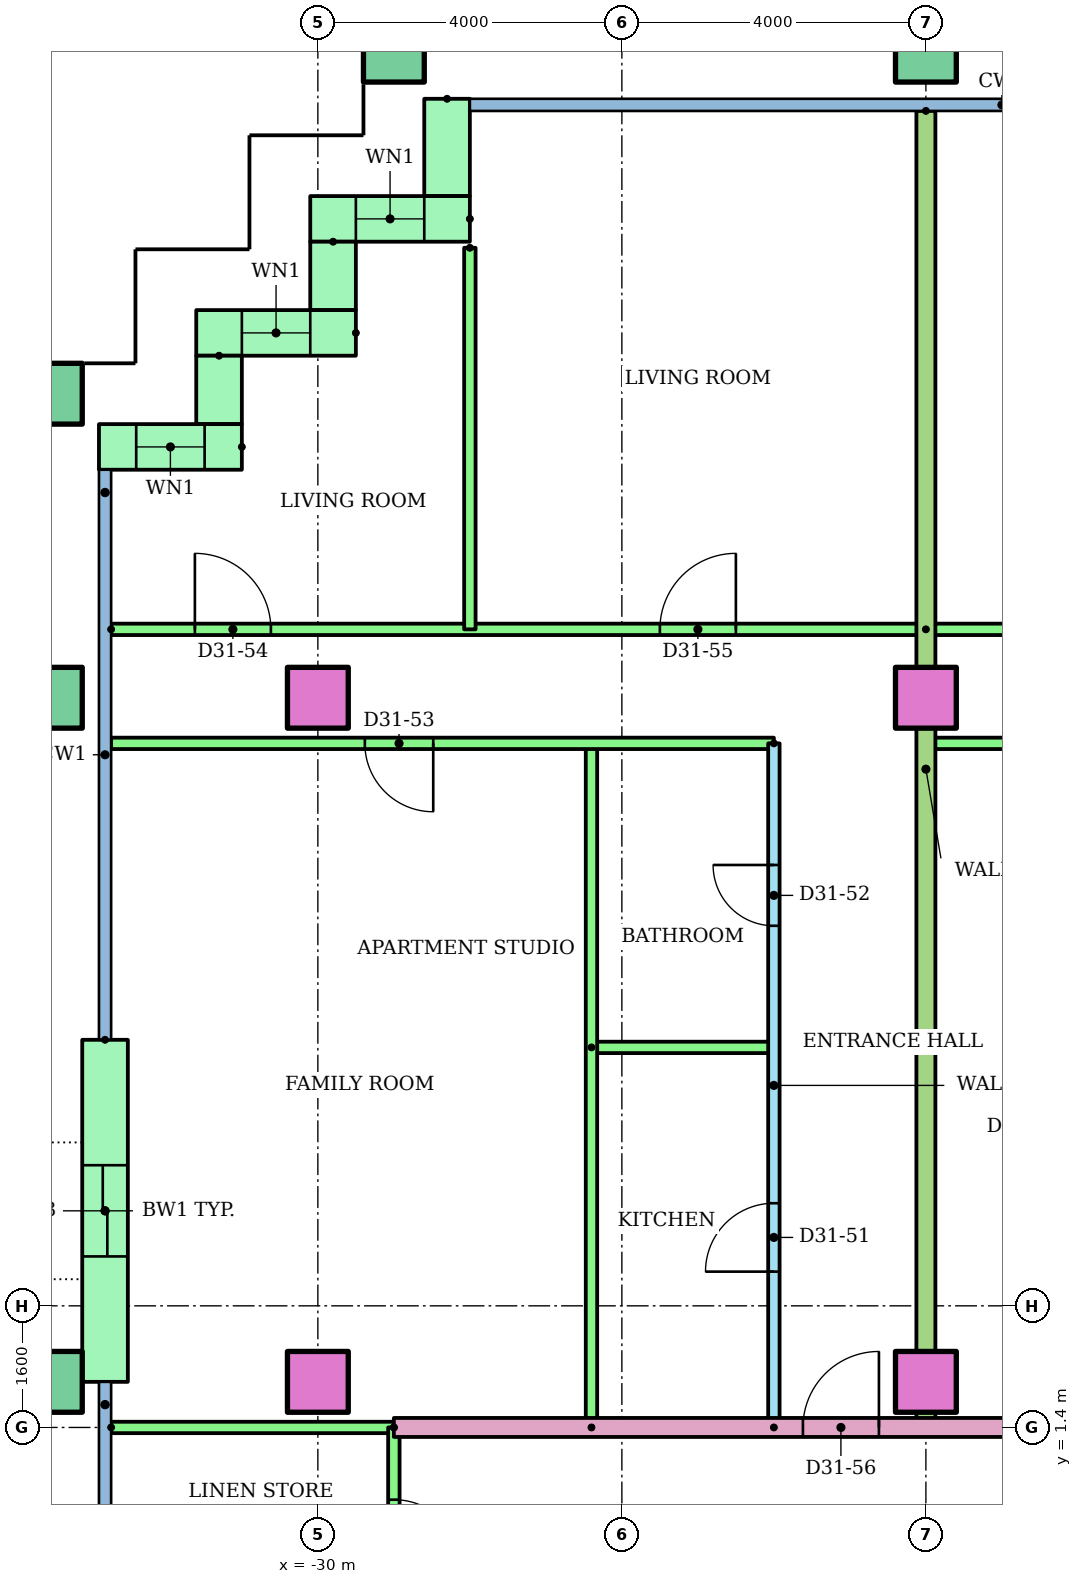
"""IFC4 building model, lengths in metres.
Left out: names, types, materials, properties, quantities, classifications, styles, units other than length and angle.
Written with IfcOpenShell. Run it as: python <this file> out.ifc"""

import sys

from ifc_helpers import new_model, si_unit, direction, frame, frame_2d, origin, origin_2d, place, context, subcontext, project, spatial, rectangle, hollow_rectangle, extrude, element, fill, save


model = new_model("IFC4")
c1 = context("Model", 3, precision=1e-05, world=origin(), true_north=direction((0.0, 1.0)))
c2 = subcontext(c1, "Body", "Model", "MODEL_VIEW")
j1 = project(units=[si_unit("LENGTHUNIT", "METRE"), si_unit("PLANEANGLEUNIT", "RADIAN")], contexts=[c1])
p1 = place(None, origin())
s1 = spatial("IfcSite", under=j1, at=p1, CompositionType="ELEMENT")
p2 = place(p1, origin())
s2 = spatial("IfcBuilding", under=s1, at=p2, CompositionType="ELEMENT")
p3 = place(p2, frame((0.0, 0.0, 123.0)))
s3 = spatial("IfcBuildingStorey", under=s2, at=p3, CompositionType="ELEMENT", Elevation=123.0)
p4 = place(p3, frame((-33.5, 2.0, 0.0)))
e1 = element("IfcColumn", 1, at=p4, inside=s3, PredefinedType="COLUMN", context=c2, shape_type="SweptSolid", body=[
    extrude(hollow_rectangle(XDim=0.8, YDim=0.8, WallThickness=0.04, at=origin_2d()), origin(), (0.0, 0.0, 1.0), 3.2),
])
for number, where in (
    (2, (-30.0, 2.0, 0.0)),
    (3, (-22.0, 2.0, 0.0)),
):
    element("IfcColumn", number, at=place(p3, frame(where)), inside=s3, PredefinedType="COLUMN", context=c2, shape_type="SweptSolid", body=[
        extrude(rectangle(XDim=0.8, YDim=0.8, at=origin_2d()), origin(), (0.0, 0.0, 1.0), 3.2),
    ])
p5 = place(p3, frame((-33.5, 11.0, 0.0)))
e4 = element("IfcColumn", 4, at=p5, inside=s3, PredefinedType="COLUMN", context=c2, shape_type="SweptSolid", body=[
    extrude(hollow_rectangle(XDim=0.8, YDim=0.8, WallThickness=0.04, at=origin_2d()), origin(), (0.0, 0.0, 1.0), 3.2),
])
for number, where in (
    (5, (-30.0, 11.0, 0.0)),
    (6, (-22.0, 11.0, 0.0)),
):
    element("IfcColumn", number, at=place(p3, frame(where)), inside=s3, PredefinedType="COLUMN", context=c2, shape_type="SweptSolid", body=[
        extrude(rectangle(XDim=0.8, YDim=0.8, at=origin_2d()), origin(), (0.0, 0.0, 1.0), 3.2),
    ])
for number, where in (
    (7, (-33.5, 15.0, 0.0)),
    (8, (-29.0, 19.5, 0.0)),
    (9, (-22.0, 19.5, 0.0)),
):
    element("IfcColumn", number, at=place(p3, frame(where)), inside=s3, PredefinedType="COLUMN", context=c2, shape_type="SweptSolid", body=[
        extrude(hollow_rectangle(XDim=0.8, YDim=0.8, WallThickness=0.04, at=origin_2d()), origin(), (0.0, 0.0, 1.0), 3.2),
    ])
p6 = place(p3, frame((-28.3, 18.88, 0.0), z_axis=(0.0, 0.0, 1.0), x_axis=(0.0, -1.0, 0.0)))
e10 = element("IfcWall", 10, at=p6, inside=s3, PredefinedType="STANDARD", context=c2, shape_type="SweptSolid", body=[
    extrude(rectangle(XDim=1.28, YDim=0.6, at=frame_2d((0.64, 0.0))), origin(), (0.0, 0.0, 1.0), 2.92),
])
p7 = place(p3, frame((-28.0, 17.3, 0.0), z_axis=(0.0, 0.0, 1.0), x_axis=(-1.0, 0.0, 0.0)))
e11 = element("IfcWall", 11, at=p7, inside=s3, PredefinedType="STANDARD", context=c2, shape_type="SweptSolid", body=[
    extrude(rectangle(XDim=2.1, YDim=0.6, at=frame_2d((1.05, 0.0))), origin(), (0.0, 0.0, 1.0), 2.92),
])
p8 = place(p7, frame((0.6, 0.0, 0.9)))
e12 = element("IfcOpeningElement", 12, at=p8, cuts=e11, PredefinedType="OPENING", context=c2, shape_type="SweptSolid", body=[
    extrude(rectangle(XDim=0.9, YDim=1.5, at=frame_2d((0.45, 0.75))), frame((0.0, 0.31, 0.0), z_axis=(0.0, -1.0, 0.0), x_axis=(1.0, 0.0, 0.0)), (0.0, 0.0, 1.0), 0.62),
])
p9 = place(p3, frame((-29.8, 17.0, 0.0), z_axis=(0.0, 0.0, 1.0), x_axis=(0.0, -1.0, 0.0)))
e13 = element("IfcWall", 13, at=p9, inside=s3, PredefinedType="STANDARD", context=c2, shape_type="SweptSolid", body=[
    extrude(rectangle(XDim=0.9, YDim=0.6, at=frame_2d((0.45, 0.0))), origin(), (0.0, 0.0, 1.0), 2.92),
])
p10 = place(p3, frame((-29.5, 15.8, 0.0), z_axis=(0.0, 0.0, 1.0), x_axis=(-1.0, 0.0, 0.0)))
e14 = element("IfcWall", 14, at=p10, inside=s3, PredefinedType="STANDARD", context=c2, shape_type="SweptSolid", body=[
    extrude(rectangle(XDim=2.1, YDim=0.6, at=frame_2d((1.05, 0.0))), origin(), (0.0, 0.0, 1.0), 2.92),
])
p11 = place(p10, frame((0.6, 0.0, 0.9)))
e15 = element("IfcOpeningElement", 15, at=p11, cuts=e14, PredefinedType="OPENING", context=c2, shape_type="SweptSolid", body=[
    extrude(rectangle(XDim=0.9, YDim=1.5, at=frame_2d((0.45, 0.75))), frame((0.0, 0.31, 0.0), z_axis=(0.0, -1.0, 0.0), x_axis=(1.0, 0.0, 0.0)), (0.0, 0.0, 1.0), 0.62),
])
p12 = place(p3, frame((-31.3, 15.5, 0.0), z_axis=(0.0, 0.0, 1.0), x_axis=(0.0, -1.0, 0.0)))
e16 = element("IfcWall", 16, at=p12, inside=s3, PredefinedType="STANDARD", context=c2, shape_type="SweptSolid", body=[
    extrude(rectangle(XDim=0.9, YDim=0.6, at=frame_2d((0.45, 0.0))), origin(), (0.0, 0.0, 1.0), 2.92),
])
p13 = place(p3, frame((-31.0, 14.3, 0.0), z_axis=(0.0, 0.0, 1.0), x_axis=(-1.0, 0.0, 0.0)))
e17 = element("IfcWall", 17, at=p13, inside=s3, PredefinedType="STANDARD", context=c2, shape_type="SweptSolid", body=[
    extrude(rectangle(XDim=1.88, YDim=0.6, at=frame_2d((0.94, 0.0))), origin(), (0.0, 0.0, 1.0), 2.92),
])
p14 = place(p13, frame((0.49, 0.0, 0.9)))
e18 = element("IfcOpeningElement", 18, at=p14, cuts=e17, PredefinedType="OPENING", context=c2, shape_type="SweptSolid", body=[
    extrude(rectangle(XDim=0.9, YDim=1.5, at=frame_2d((0.45, 0.75))), frame((0.0, 0.31, 0.0), z_axis=(0.0, -1.0, 0.0), x_axis=(1.0, 0.0, 0.0)), (0.0, 0.0, 1.0), 0.62),
])
p15 = place(p3, frame((-32.8, 6.5, 0.0), z_axis=(0.0, 0.0, 1.0), x_axis=(0.0, -1.0, 0.0)))
e19 = element("IfcWall", 19, at=p15, inside=s3, PredefinedType="STANDARD", context=c2, shape_type="SweptSolid", body=[
    extrude(rectangle(XDim=4.5, YDim=0.6, at=frame_2d((2.25, 0.0))), origin(), (0.0, 0.0, 1.0), 2.92),
])
p16 = place(p15, frame((1.65, 0.0, 0.0)))
e20 = element("IfcOpeningElement", 20, at=p16, cuts=e19, PredefinedType="OPENING", context=c2, shape_type="SweptSolid", body=[
    extrude(rectangle(XDim=1.2, YDim=2.1, at=frame_2d((0.6, 1.05))), frame((0.0, 0.31, 0.0), z_axis=(0.0, -1.0, 0.0), x_axis=(1.0, 0.0, 0.0)), (0.0, 0.0, 1.0), 0.62),
])
p17 = place(p3, frame((-24.0, 1.4, 0.0), z_axis=(0.0, 0.0, 1.0), x_axis=(0.0, 1.0, 0.0)))
e21 = element("IfcWall", 21, at=p17, inside=s3, PredefinedType="PARTITIONING", context=c2, shape_type="SweptSolid", body=[
    extrude(rectangle(XDim=9.0, YDim=0.15, at=frame_2d((4.5, 0.0))), origin(), (0.0, 0.0, 1.0), 2.4),
])
p18 = place(p17, frame((2.05, 0.0, 0.0)))
e22 = element("IfcOpeningElement", 22, at=p18, cuts=e21, PredefinedType="OPENING", context=c2, shape_type="SweptSolid", body=[
    extrude(rectangle(XDim=0.9, YDim=2.1, at=frame_2d((0.45, 1.05))), frame((0.0, 0.085, 0.0), z_axis=(0.0, -1.0, 0.0), x_axis=(1.0, 0.0, 0.0)), (0.0, 0.0, 1.0), 0.17),
])
p19 = place(p17, frame((6.6, 0.0, 0.0)))
e23 = element("IfcOpeningElement", 23, at=p19, cuts=e21, PredefinedType="OPENING", context=c2, shape_type="SweptSolid", body=[
    extrude(rectangle(XDim=0.8, YDim=2.1, at=frame_2d((0.4, 1.05))), frame((0.0, 0.085, 0.0), z_axis=(0.0, -1.0, 0.0), x_axis=(1.0, 0.0, 0.0)), (0.0, 0.0, 1.0), 0.17),
])
p20 = place(p3, frame((-26.4, 6.4, 0.0)))
e24 = element("IfcWall", 24, at=p20, inside=s3, PredefinedType="PARTITIONING", context=c2, shape_type="SweptSolid", body=[
    extrude(rectangle(XDim=2.4, YDim=0.15, at=frame_2d((1.2, 0.0))), origin(), (0.0, 0.0, 1.0), 2.4),
])
p21 = place(p3, frame((-26.4, 1.4, 0.0), z_axis=(0.0, 0.0, 1.0), x_axis=(0.0, 1.0, 0.0)))
e25 = element("IfcWall", 25, at=p21, inside=s3, PredefinedType="PARTITIONING", context=c2, shape_type="SweptSolid", body=[
    extrude(rectangle(XDim=9.0, YDim=0.15, at=frame_2d((4.5, 0.0))), origin(), (0.0, 0.0, 1.0), 2.4),
])
p22 = place(p3, frame((-24.0, 10.4, 0.0), z_axis=(0.0, 0.0, 1.0), x_axis=(-1.0, 0.0, 0.0)))
e26 = element("IfcWall", 26, at=p22, inside=s3, PredefinedType="PARTITIONING", context=c2, shape_type="SweptSolid", body=[
    extrude(rectangle(XDim=8.72, YDim=0.15, at=frame_2d((4.36, 0.0))), origin(), (0.0, 0.0, 1.0), 2.4),
])
p23 = place(p22, frame((4.482, 0.0, 0.0)))
e27 = element("IfcOpeningElement", 27, at=p23, cuts=e26, PredefinedType="OPENING", context=c2, shape_type="SweptSolid", body=[
    extrude(rectangle(XDim=0.9, YDim=2.1, at=frame_2d((0.45, 1.05))), frame((0.0, 0.085, 0.0), z_axis=(0.0, -1.0, 0.0), x_axis=(1.0, 0.0, 0.0)), (0.0, 0.0, 1.0), 0.17),
])
p24 = place(p3, frame((-32.72, 11.9, 0.0)))
e28 = element("IfcWall", 28, at=p24, inside=s3, PredefinedType="PARTITIONING", context=c2, shape_type="SweptSolid", body=[
    extrude(rectangle(XDim=10.72, YDim=0.15, at=frame_2d((5.36, 0.0))), origin(), (0.0, 0.0, 1.0), 2.4),
])
p25 = place(p24, frame((1.102, 0.0, 0.0)))
e29 = element("IfcOpeningElement", 29, at=p25, cuts=e28, PredefinedType="OPENING", context=c2, shape_type="SweptSolid", body=[
    extrude(rectangle(XDim=1.0, YDim=2.1, at=frame_2d((0.5, 1.05))), frame((0.0, 0.085, 0.0), z_axis=(0.0, -1.0, 0.0), x_axis=(1.0, 0.0, 0.0)), (0.0, 0.0, 1.0), 0.17),
])
p26 = place(p24, frame((7.22, 0.0, 0.0)))
e30 = element("IfcOpeningElement", 30, at=p26, cuts=e28, PredefinedType="OPENING", context=c2, shape_type="SweptSolid", body=[
    extrude(rectangle(XDim=1.0, YDim=2.1, at=frame_2d((0.5, 1.05))), frame((0.0, 0.085, 0.0), z_axis=(0.0, -1.0, 0.0), x_axis=(1.0, 0.0, 0.0)), (0.0, 0.0, 1.0), 0.17),
])
p27 = place(p3, frame((-28.0, 16.92, 0.0), z_axis=(0.0, 0.0, 1.0), x_axis=(0.0, -1.0, 0.0)))
e31 = element("IfcWall", 31, at=p27, inside=s3, PredefinedType="PARTITIONING", context=c2, shape_type="SweptSolid", body=[
    extrude(rectangle(XDim=5.02, YDim=0.15, at=frame_2d((2.51, 0.0))), origin(), (0.0, 0.0, 1.0), 2.4),
])
p28 = place(p3, frame((-16.0, 10.4, 0.0), z_axis=(0.0, 0.0, 1.0), x_axis=(-1.0, 0.0, 0.0)))
e32 = element("IfcWall", 32, at=p28, inside=s3, PredefinedType="PARTITIONING", context=c2, shape_type="SweptSolid", body=[
    extrude(rectangle(XDim=6.0, YDim=0.15, at=frame_2d((3.0, 0.0))), origin(), (0.0, 0.0, 1.0), 2.4),
])
p29 = place(p28, frame((3.75, 0.0, 0.0)))
e33 = element("IfcOpeningElement", 33, at=p29, cuts=e32, PredefinedType="OPENING", context=c2, shape_type="SweptSolid", body=[
    extrude(rectangle(XDim=0.9, YDim=2.1, at=frame_2d((0.45, 1.05))), frame((0.0, 0.085, 0.0), z_axis=(0.0, -1.0, 0.0), x_axis=(1.0, 0.0, 0.0)), (0.0, 0.0, 1.0), 0.17),
])
p30 = place(p3, frame((-22.0, 11.9, 0.0)))
e34 = element("IfcWall", 34, at=p30, inside=s3, PredefinedType="PARTITIONING", context=c2, shape_type="SweptSolid", body=[
    extrude(rectangle(XDim=8.0, YDim=0.15, at=frame_2d((4.0, 0.0))), origin(), (0.0, 0.0, 1.0), 2.4),
])
p31 = place(p30, frame((3.5, 0.0, 0.0)))
e35 = element("IfcOpeningElement", 35, at=p31, cuts=e34, PredefinedType="OPENING", context=c2, shape_type="SweptSolid", body=[
    extrude(rectangle(XDim=1.0, YDim=2.1, at=frame_2d((0.5, 1.05))), frame((0.0, 0.085, 0.0), z_axis=(0.0, -1.0, 0.0), x_axis=(1.0, 0.0, 0.0)), (0.0, 0.0, 1.0), 0.17),
])
p32 = place(p3, frame((-22.0, 18.721, 0.0), z_axis=(0.0, 0.0, 1.0), x_axis=(0.0, -1.0, 0.0)))
e36 = element("IfcWall", 36, at=p32, inside=s3, PredefinedType="PARTITIONING", context=c2, shape_type="SweptSolid", body=[
    extrude(rectangle(XDim=17.321, YDim=0.25, at=frame_2d((8.661, 0.0))), origin(), (0.0, 0.0, 1.0), 2.4),
])
p33 = place(p3, frame((-29.0, 1.4, 0.0)))
e37 = element("IfcWall", 37, at=p33, inside=s3, PredefinedType="PARTITIONING", context=c2, shape_type="SweptSolid", body=[
    extrude(rectangle(XDim=15.0, YDim=0.25, at=frame_2d((7.5, 0.0))), origin(), (0.0, 0.0, 1.0), 2.4),
])
p34 = place(p33, frame((5.382, 0.0, 0.0)))
e38 = element("IfcOpeningElement", 38, at=p34, cuts=e37, PredefinedType="OPENING", context=c2, shape_type="SweptSolid", body=[
    extrude(rectangle(XDim=1.0, YDim=2.1, at=frame_2d((0.5, 1.05))), frame((0.0, 0.135, 0.0), z_axis=(0.0, -1.0, 0.0), x_axis=(1.0, 0.0, 0.0)), (0.0, 0.0, 1.0), 0.27),
])
p35 = place(p33, frame((13.5, 0.0, 0.0)))
e39 = element("IfcOpeningElement", 39, at=p35, cuts=e37, PredefinedType="OPENING", context=c2, shape_type="SweptSolid", body=[
    extrude(rectangle(XDim=1.0, YDim=2.1, at=frame_2d((0.5, 1.05))), frame((0.0, 0.135, 0.0), z_axis=(0.0, -1.0, 0.0), x_axis=(1.0, 0.0, 0.0)), (0.0, 0.0, 1.0), 0.27),
])
p36 = place(p3, frame((-32.72, 1.4, 0.0)))
e40 = element("IfcWall", 40, at=p36, inside=s3, PredefinedType="PARTITIONING", context=c2, shape_type="SweptSolid", body=[
    extrude(rectangle(XDim=3.72, YDim=0.15, at=frame_2d((1.86, 0.0))), origin(), (0.0, 0.0, 1.0), 2.4),
])
p37 = place(p3, frame((-29.0, 1.4, 0.0), z_axis=(0.0, 0.0, 1.0), x_axis=(0.0, -1.0, 0.0)))
e41 = element("IfcWall", 41, at=p37, inside=s3, PredefinedType="PARTITIONING", context=c2, shape_type="SweptSolid", body=[
    extrude(rectangle(XDim=2.8, YDim=0.15, at=frame_2d((1.4, 0.0))), origin(), (0.0, 0.0, 1.0), 2.4),
])
p38 = place(p37, frame((0.95, 0.0, 0.0)))
e42 = element("IfcOpeningElement", 42, at=p38, cuts=e41, PredefinedType="OPENING", context=c2, shape_type="SweptSolid", body=[
    extrude(rectangle(XDim=0.9, YDim=2.1, at=frame_2d((0.45, 1.05))), frame((0.0, 0.085, 0.0), z_axis=(0.0, -1.0, 0.0), x_axis=(1.0, 0.0, 0.0)), (0.0, 0.0, 1.0), 0.17),
])
p39 = place(p8, origin())
e43 = element("IfcWindow", 43, at=p39, inside=s3, PartitioningType="SINGLE_PANEL", PredefinedType="WINDOW", context=c2, shape_type="SweptSolid", body=[
    extrude(rectangle(XDim=0.9, YDim=1.5, at=frame_2d((0.45, 0.75))), frame((0.0, 0.03, 0.0), z_axis=(0.0, -1.0, 0.0), x_axis=(1.0, 0.0, 0.0)), (0.0, 0.0, 1.0), 0.06),
])
fill(e12, e43)
p40 = place(p11, origin())
e44 = element("IfcWindow", 44, at=p40, inside=s3, PartitioningType="SINGLE_PANEL", PredefinedType="WINDOW", context=c2, shape_type="SweptSolid", body=[
    extrude(rectangle(XDim=0.9, YDim=1.5, at=frame_2d((0.45, 0.75))), frame((0.0, 0.03, 0.0), z_axis=(0.0, -1.0, 0.0), x_axis=(1.0, 0.0, 0.0)), (0.0, 0.0, 1.0), 0.06),
])
fill(e15, e44)
p41 = place(p14, origin())
e45 = element("IfcWindow", 45, at=p41, inside=s3, PartitioningType="SINGLE_PANEL", PredefinedType="WINDOW", context=c2, shape_type="SweptSolid", body=[
    extrude(rectangle(XDim=0.9, YDim=1.5, at=frame_2d((0.45, 0.75))), frame((0.0, 0.03, 0.0), z_axis=(0.0, -1.0, 0.0), x_axis=(1.0, 0.0, 0.0)), (0.0, 0.0, 1.0), 0.06),
])
fill(e18, e45)
p42 = place(p18, origin())
e46 = element("IfcDoor", 46, at=p42, inside=s3, OperationType="SINGLE_SWING_LEFT", PredefinedType="DOOR", context=c2, shape_type="SweptSolid", body=[
    extrude(rectangle(XDim=0.9, YDim=2.1, at=frame_2d((0.45, 1.05))), frame((0.0, 0.025, 0.0), z_axis=(0.0, -1.0, 0.0), x_axis=(1.0, 0.0, 0.0)), (0.0, 0.0, 1.0), 0.05),
])
fill(e22, e46)
p43 = place(p19, origin())
e47 = element("IfcDoor", 47, at=p43, inside=s3, OperationType="SINGLE_SWING_RIGHT", PredefinedType="DOOR", context=c2, shape_type="SweptSolid", body=[
    extrude(rectangle(XDim=0.8, YDim=2.1, at=frame_2d((0.4, 1.05))), frame((0.0, 0.025, 0.0), z_axis=(0.0, -1.0, 0.0), x_axis=(1.0, 0.0, 0.0)), (0.0, 0.0, 1.0), 0.05),
])
fill(e23, e47)
p44 = place(p23, origin())
e48 = element("IfcDoor", 48, at=p44, inside=s3, OperationType="SINGLE_SWING_LEFT", PredefinedType="DOOR", context=c2, shape_type="SweptSolid", body=[
    extrude(rectangle(XDim=0.9, YDim=2.1, at=frame_2d((0.45, 1.05))), frame((0.0, 0.025, 0.0), z_axis=(0.0, -1.0, 0.0), x_axis=(1.0, 0.0, 0.0)), (0.0, 0.0, 1.0), 0.05),
])
fill(e27, e48)
p45 = place(p25, origin())
e49 = element("IfcDoor", 49, at=p45, inside=s3, OperationType="SINGLE_SWING_LEFT", PredefinedType="DOOR", context=c2, shape_type="SweptSolid", body=[
    extrude(rectangle(XDim=1.0, YDim=2.1, at=frame_2d((0.5, 1.05))), frame((0.0, 0.025, 0.0), z_axis=(0.0, -1.0, 0.0), x_axis=(1.0, 0.0, 0.0)), (0.0, 0.0, 1.0), 0.05),
])
fill(e29, e49)
p46 = place(p26, origin())
e50 = element("IfcDoor", 50, at=p46, inside=s3, OperationType="SINGLE_SWING_RIGHT", PredefinedType="DOOR", context=c2, shape_type="SweptSolid", body=[
    extrude(rectangle(XDim=1.0, YDim=2.1, at=frame_2d((0.5, 1.05))), frame((0.0, 0.025, 0.0), z_axis=(0.0, -1.0, 0.0), x_axis=(1.0, 0.0, 0.0)), (0.0, 0.0, 1.0), 0.05),
])
fill(e30, e50)
p47 = place(p34, origin())
e51 = element("IfcDoor", 51, at=p47, inside=s3, OperationType="SINGLE_SWING_RIGHT", PredefinedType="DOOR", context=c2, shape_type="SweptSolid", body=[
    extrude(rectangle(XDim=1.0, YDim=2.1, at=frame_2d((0.5, 1.05))), frame((0.0, 0.025, 0.0), z_axis=(0.0, -1.0, 0.0), x_axis=(1.0, 0.0, 0.0)), (0.0, 0.0, 1.0), 0.05),
])
fill(e38, e51)
p48 = place(p38, origin())
e52 = element("IfcDoor", 52, at=p48, inside=s3, OperationType="SINGLE_SWING_RIGHT", PredefinedType="DOOR", context=c2, shape_type="SweptSolid", body=[
    extrude(rectangle(XDim=0.9, YDim=2.1, at=frame_2d((0.45, 1.05))), frame((0.0, 0.025, 0.0), z_axis=(0.0, -1.0, 0.0), x_axis=(1.0, 0.0, 0.0)), (0.0, 0.0, 1.0), 0.05),
])
fill(e42, e52)
p49 = place(p16, origin())
e53 = element("IfcDoor", 53, at=p49, inside=s3, OperationType="SLIDING_TO_LEFT", PredefinedType="DOOR", context=c2, shape_type="SweptSolid", body=[
    extrude(rectangle(XDim=1.2, YDim=2.1, at=frame_2d((0.6, 1.05))), frame((0.0, 0.025, 0.0), z_axis=(0.0, -1.0, 0.0), x_axis=(1.0, 0.0, 0.0)), (0.0, 0.0, 1.0), 0.05),
])
fill(e20, e53)
save(model, sys.argv[1])
